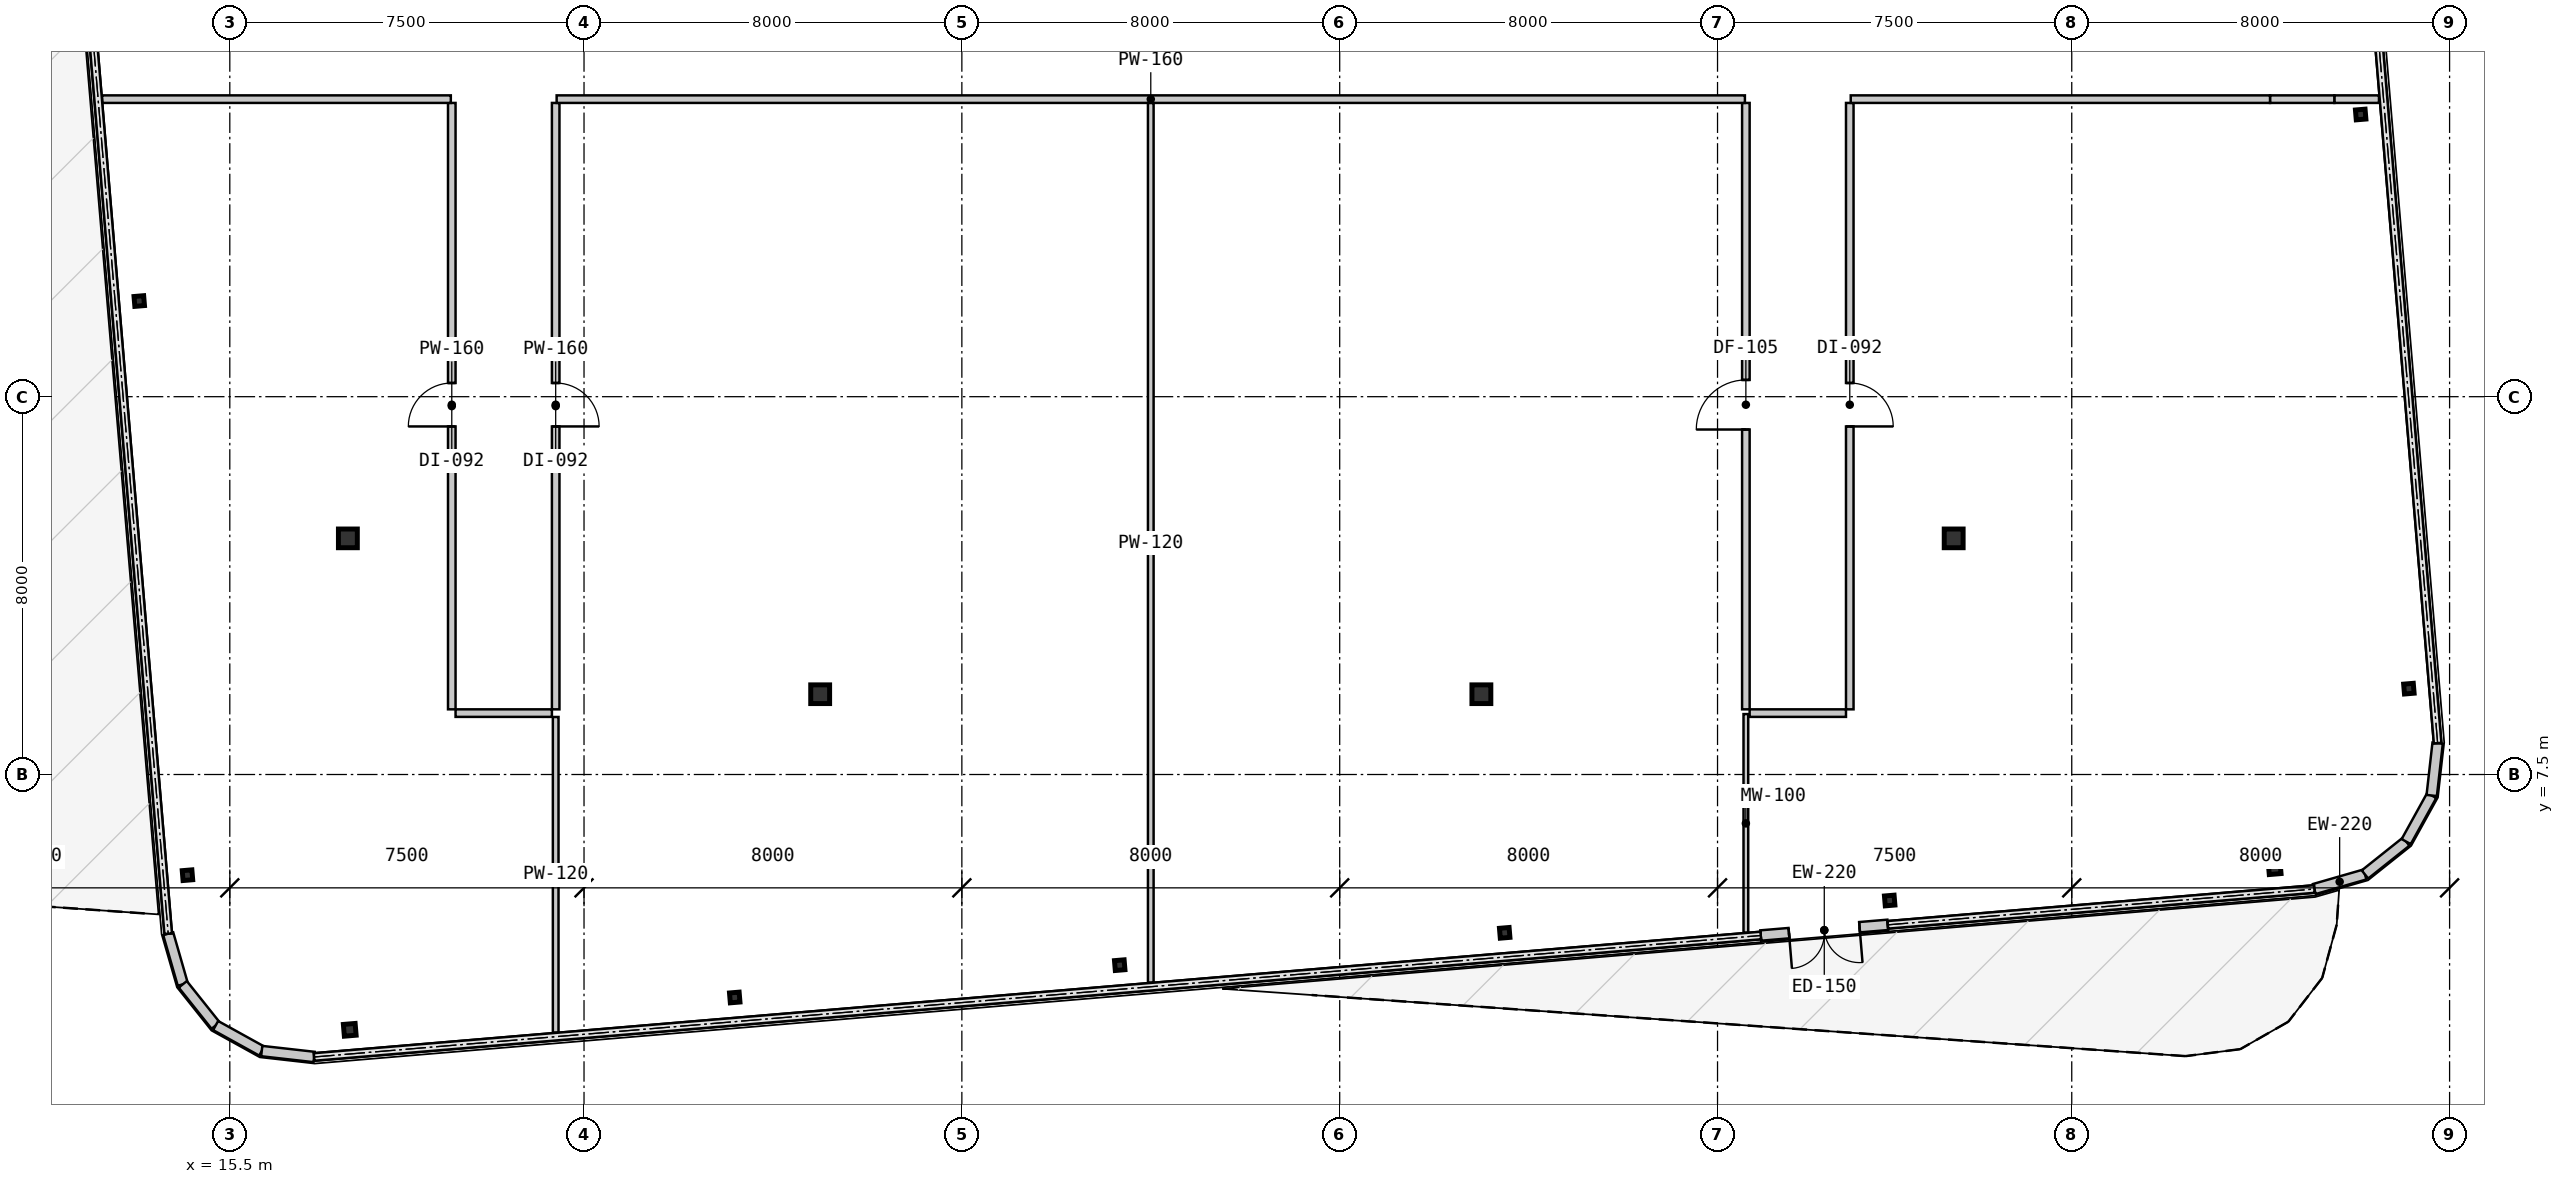
"""IFC4 building model, lengths in metres.
Left out: names, types, materials, properties, quantities, classifications, styles, units other than length and angle.
Written with IfcOpenShell. Run it as: python <this file> out.ifc"""

import sys

from ifc_helpers import new_model, si_unit, direction, frame, frame_2d, origin, origin_2d, place, context, subcontext, project, spatial, rectangle, hollow_rectangle, i_section, extrude, source, transform, mapped, element, fill, save


model = new_model("IFC4")
c1 = context("Model", 3, precision=1e-05, world=origin(), true_north=direction((0.0, 1.0)))
c2 = subcontext(c1, "Body", "Model", "MODEL_VIEW")
j1 = project(units=[si_unit("LENGTHUNIT", "METRE"), si_unit("PLANEANGLEUNIT", "RADIAN")], contexts=[c1])
p1 = place(None, origin())
s1 = spatial("IfcSite", under=j1, at=p1, CompositionType="ELEMENT")
p2 = place(p1, origin())
s2 = spatial("IfcBuilding", under=s1, at=p2, CompositionType="ELEMENT")
p3 = place(p2, frame((0.0, 0.0, 168.7)))
s3 = spatial("IfcBuildingStorey", under=s2, at=p3, CompositionType="ELEMENT", Elevation=168.7)
m1 = source(origin(), c2, "Body", "SweptSolid", [
    extrude(i_section(OverallWidth=0.4, OverallDepth=0.396, WebThickness=0.022, FlangeThickness=0.034, at=origin_2d()), origin(), (0.0, 0.0, 1.0), 3.85),
])
for number, where, z_axis, x_axis in (
    (1, (28.0, 9.2, 0.0), (0.0, 0.0, 1.0), (1.0, 0.0, 0.0)),
    (2, (42.0, 9.2, 0.0), (0.0, 0.0, 1.0), (1.0, 0.0, 0.0)),
    (3, (18.0, 12.5, 0.0), (0.0, 0.0, 1.0), (1.0, 0.0, 0.0)),
    (4, (52.0, 12.5, 0.0), (0.0, 0.0, 1.0), (1.0, 0.0, 0.0)),
):
    element("IfcColumn", number, at=place(p3, frame(where, z_axis=z_axis, x_axis=x_axis)), inside=s3, PredefinedType="COLUMN", context=c2, shape_type="MappedRepresentation", body=[
        mapped(m1, transform((0.0, 0.0, 0.0), scale=1.0)),
    ])
m2 = source(origin(), c2, "Body", "SweptSolid", [
    extrude(hollow_rectangle(XDim=0.25, YDim=0.25, WallThickness=0.01, at=origin_2d()), origin(), (0.0, 0.0, 1.0), 3.85),
])
p4 = place(p3, frame((18.04, 2.094, 0.0), z_axis=(0.0, 0.0, 1.0), x_axis=(0.99649285925, 0.083677843332, 0.0)))
e5 = element("IfcColumn", 5, at=p4, inside=s3, PredefinedType="COLUMN", context=c2, shape_type="MappedRepresentation", body=[
    mapped(m2, transform((0.0, 0.0, 0.0), scale=1.0)),
])
m3 = source(origin(), c2, "Body", "SweptSolid", [
    extrude(i_section(OverallWidth=0.205, OverallDepth=0.21, WebThickness=0.009, FlangeThickness=0.014, at=origin_2d()), origin(), (0.0, 0.0, 1.0), 3.85),
])
for number, where, z_axis, x_axis in (
    (6, (26.191, 2.779, 0.0), (0.0, 0.0, 1.0), (0.996, 0.084, 0.0)),
    (7, (34.342, 3.463, 0.0), (0.0, 0.0, 1.0), (0.996, 0.084, 0.0)),
    (8, (42.494, 4.147, 0.0), (0.0, 0.0, 1.0), (0.996, 0.084, 0.0)),
    (9, (50.645, 4.832, 0.0), (0.0, 0.0, 1.0), (0.996, 0.084, 0.0)),
):
    element("IfcColumn", number, at=place(p3, frame(where, z_axis=z_axis, x_axis=x_axis)), inside=s3, PredefinedType="COLUMN", context=c2, shape_type="MappedRepresentation", body=[
        mapped(m3, transform((0.0, 0.0, 0.0), scale=1.0)),
    ])
p5 = place(p3, frame((58.796, 5.516, 0.0), z_axis=(0.0, 0.0, 1.0), x_axis=(0.99649285925, 0.083677843332, 0.0)))
e10 = element("IfcColumn", 10, at=p5, inside=s3, PredefinedType="COLUMN", context=c2, shape_type="MappedRepresentation", body=[
    mapped(m2, transform((0.0, 0.0, 0.0), scale=1.0)),
])
for number, where, z_axis, x_axis in (
    (11, (14.604, 5.368, 0.0), (0.0, 0.0, 1.0), (0.996, 0.084, 0.0)),
    (12, (13.583, 17.525, 0.0), (0.0, 0.0, 1.0), (0.996, 0.084, 0.0)),
    (13, (61.638, 9.318, 0.0), (0.0, 0.0, 1.0), (0.996, 0.084, 0.0)),
    (14, (60.617, 21.475, 0.0), (0.0, 0.0, 1.0), (0.996, 0.084, 0.0)),
):
    element("IfcColumn", number, at=place(p3, frame(where, z_axis=z_axis, x_axis=x_axis)), inside=s3, PredefinedType="COLUMN", context=c2, shape_type="MappedRepresentation", body=[
        mapped(m3, transform((0.0, 0.0, 0.0), scale=1.0)),
    ])
m4 = source(origin(), c2, "Body", "SweptSolid", [
    extrude(rectangle(XDim=1.116, YDim=0.22, at=frame_2d((0.558, 0.0))), origin(), (0.0, 0.0, 1.0), 3.63),
])
for number, where, z_axis, x_axis in (
    (15, (59.636, 5.075, 0.0), (0.0, 0.0, 1.0), (0.961, 0.277, 0.0)),
    (16, (60.708, 5.384, 0.0), (0.0, 0.0, 1.0), (0.782, 0.623, 0.0)),
    (17, (61.581, 6.079, 0.0), (0.0, 0.0, 1.0), (0.484, 0.875, 0.0)),
    (18, (62.121, 7.056, 0.0), (0.0, 0.0, 1.0), (0.112, 0.994, 0.0)),
    (19, (14.196, 4.13, 0.0), (0.0, 0.0, 1.0), (0.277, -0.961, 0.0)),
    (20, (14.504, 3.057, 0.0), (0.0, 0.0, 1.0), (0.623, -0.782, 0.0)),
    (21, (15.2, 2.184, 0.0), (0.0, 0.0, 1.0), (0.875, -0.484, 0.0)),
    (22, (16.176, 1.644, 0.0), (0.0, 0.0, 1.0), (0.994, -0.112, 0.0)),
):
    element("IfcWall", number, at=place(p3, frame(where, z_axis=z_axis, x_axis=x_axis)), inside=s3, PredefinedType="SOLIDWALL", context=c2, shape_type="MappedRepresentation", body=[
        mapped(m4, transform((0.0, 0.0, 0.0), scale=1.0)),
    ])
m5 = source(origin(), c2, "Body", "SweptSolid", [
    extrude(rectangle(XDim=2.7, YDim=0.22, at=frame_2d((1.35, 0.0))), origin(), (0.0, 0.0, 1.0), 3.63),
])
p6 = place(p3, frame((47.915, 4.091, 0.0), z_axis=(0.0, 0.0, 1.0), x_axis=(0.99648878097, 0.083726396078, 0.0)))
e23 = element("IfcWall", 23, at=p6, inside=s3, PredefinedType="SOLIDWALL", context=c2, shape_type="MappedRepresentation", body=[
    mapped(m5, transform((0.0, 0.0, 0.0), scale=1.0)),
])
m6 = source(origin(), c2, "Body", "SweptSolid", [
    extrude(rectangle(XDim=1.5, YDim=2.2, at=frame_2d((0.75, 1.1))), frame((0.0, 0.12, 0.0), z_axis=(0.0, -1.0, 0.0), x_axis=(1.0, 0.0, 0.0)), (0.0, 0.0, 1.0), 0.24),
])
p7 = place(p6, frame((0.6, 0.0, 0.0)))
e24 = element("IfcOpeningElement", 24, at=p7, cuts=e23, PredefinedType="OPENING", context=c2, shape_type="MappedRepresentation", body=[
    mapped(m6, transform((0.0, 0.0, 0.0), scale=1.0)),
])
m7 = source(origin(), c2, "Body", "SweptSolid", [
    extrude(rectangle(XDim=12.84, YDim=0.16, at=frame_2d((6.42, 0.0))), origin(), (0.0, 0.0, 1.0), 3.63),
])
p8 = place(p3, frame((20.2, 8.88, 0.0), z_axis=(0.0, 0.0, 1.0), x_axis=(0.0, 1.0, 0.0)))
e25 = element("IfcWall", 25, at=p8, inside=s3, PredefinedType="PARTITIONING", context=c2, shape_type="MappedRepresentation", body=[
    mapped(m7, transform((0.0, 0.0, 0.0), scale=1.0)),
])
m8 = source(origin(), c2, "Body", "SweptSolid", [
    extrude(rectangle(XDim=0.92, YDim=2.1, at=frame_2d((0.46, 1.05))), frame((0.0, 0.09, 0.0), z_axis=(0.0, -1.0, 0.0), x_axis=(1.0, 0.0, 0.0)), (0.0, 0.0, 1.0), 0.18),
])
p9 = place(p8, frame((5.99, 0.0, 0.0)))
e26 = element("IfcOpeningElement", 26, at=p9, cuts=e25, PredefinedType="OPENING", context=c2, shape_type="MappedRepresentation", body=[
    mapped(m8, transform((0.0, 0.0, 0.0), scale=1.0)),
])
m9 = source(origin(), c2, "Body", "SweptSolid", [
    extrude(rectangle(XDim=7.384, YDim=0.16, at=frame_2d((3.692, 0.0))), origin(), (0.0, 0.0, 1.0), 3.63),
])
p10 = place(p3, frame((20.18, 21.8, 0.0), z_axis=(0.0, 0.0, 1.0), x_axis=(-1.0, 0.0, 0.0)))
e27 = element("IfcWall", 27, at=p10, inside=s3, PredefinedType="PARTITIONING", context=c2, shape_type="MappedRepresentation", body=[
    mapped(m9, transform((0.0, 0.0, 0.0), scale=1.0)),
])
m10 = source(origin(), c2, "Body", "SweptSolid", [
    extrude(rectangle(XDim=2.04, YDim=0.16, at=frame_2d((1.02, 0.0))), origin(), (0.0, 0.0, 1.0), 3.63),
])
p11 = place(p3, frame((22.32, 8.8, 0.0), z_axis=(0.0, 0.0, 1.0), x_axis=(-1.0, 0.0, 0.0)))
e28 = element("IfcWall", 28, at=p11, inside=s3, PredefinedType="PARTITIONING", context=c2, shape_type="MappedRepresentation", body=[
    mapped(m10, transform((0.0, 0.0, 0.0), scale=1.0)),
])
p12 = place(p3, frame((22.4, 21.72, 0.0), z_axis=(0.0, 0.0, 1.0), x_axis=(0.0, -1.0, 0.0)))
e29 = element("IfcWall", 29, at=p12, inside=s3, PredefinedType="PARTITIONING", context=c2, shape_type="MappedRepresentation", body=[
    mapped(m7, transform((0.0, 0.0, 0.0), scale=1.0)),
])
p13 = place(p12, frame((5.93, 0.0, 0.0)))
e30 = element("IfcOpeningElement", 30, at=p13, cuts=e29, PredefinedType="OPENING", context=c2, shape_type="MappedRepresentation", body=[
    mapped(m8, transform((0.0, 0.0, 0.0), scale=1.0)),
])
m11 = source(origin(), c2, "Body", "SweptSolid", [
    extrude(rectangle(XDim=12.559, YDim=0.16, at=frame_2d((6.28, 0.0))), origin(), (0.0, 0.0, 1.0), 3.63),
])
p14 = place(p3, frame((34.98, 21.8, 0.0), z_axis=(0.0, 0.0, 1.0), x_axis=(-1.0, 0.0, 0.0)))
e31 = element("IfcWall", 31, at=p14, inside=s3, PredefinedType="PARTITIONING", context=c2, shape_type="MappedRepresentation", body=[
    mapped(m11, transform((0.0, 0.0, 0.0), scale=1.0)),
])
p15 = place(p3, frame((47.6, 8.88, 0.0), z_axis=(0.0, 0.0, 1.0), x_axis=(0.0, 1.0, 0.0)))
e32 = element("IfcWall", 32, at=p15, inside=s3, PredefinedType="PARTITIONING", context=c2, shape_type="MappedRepresentation", body=[
    mapped(m7, transform((0.0, 0.0, 0.0), scale=1.0)),
])
m12 = source(origin(), c2, "Body", "SweptSolid", [
    extrude(rectangle(XDim=1.05, YDim=2.1, at=frame_2d((0.525, 1.05))), frame((0.0, 0.09, 0.0), z_axis=(0.0, -1.0, 0.0), x_axis=(1.0, 0.0, 0.0)), (0.0, 0.0, 1.0), 0.18),
])
p16 = place(p15, frame((5.925, 0.0, 0.0)))
e33 = element("IfcOpeningElement", 33, at=p16, cuts=e32, PredefinedType="OPENING", context=c2, shape_type="MappedRepresentation", body=[
    mapped(m12, transform((0.0, 0.0, 0.0), scale=1.0)),
])
p17 = place(p3, frame((47.58, 21.8, 0.0), z_axis=(0.0, 0.0, 1.0), x_axis=(-1.0, 0.0, 0.0)))
e34 = element("IfcWall", 34, at=p17, inside=s3, PredefinedType="PARTITIONING", context=c2, shape_type="MappedRepresentation", body=[
    mapped(m11, transform((0.0, 0.0, 0.0), scale=1.0)),
])
p18 = place(p3, frame((49.8, 21.72, 0.0), z_axis=(0.0, 0.0, 1.0), x_axis=(0.0, -1.0, 0.0)))
e35 = element("IfcWall", 35, at=p18, inside=s3, PredefinedType="PARTITIONING", context=c2, shape_type="MappedRepresentation", body=[
    mapped(m7, transform((0.0, 0.0, 0.0), scale=1.0)),
])
p19 = place(p18, frame((5.93, 0.0, 0.0)))
e36 = element("IfcOpeningElement", 36, at=p19, cuts=e35, PredefinedType="OPENING", context=c2, shape_type="MappedRepresentation", body=[
    mapped(m8, transform((0.0, 0.0, 0.0), scale=1.0)),
])
m13 = source(origin(), c2, "Body", "SweptSolid", [
    extrude(rectangle(XDim=0.945, YDim=0.16, at=frame_2d((0.473, 0.0))), origin(), (0.0, 0.0, 1.0), 3.63),
])
p20 = place(p3, frame((61.005, 21.8, 0.0), z_axis=(0.0, 0.0, 1.0), x_axis=(-1.0, 0.0, 0.0)))
e37 = element("IfcWall", 37, at=p20, inside=s3, PredefinedType="PARTITIONING", context=c2, shape_type="MappedRepresentation", body=[
    mapped(m13, transform((0.0, 0.0, 0.0), scale=1.0)),
])
m14 = source(origin(), c2, "Body", "SweptSolid", [
    extrude(rectangle(XDim=1.361, YDim=0.16, at=frame_2d((0.681, 0.0))), origin(), (0.0, 0.0, 1.0), 3.17),
])
p21 = place(p3, frame((60.059, 21.8, 0.0), z_axis=(0.0, 0.0, 1.0), x_axis=(-1.0, 0.0, 0.0)))
e38 = element("IfcWall", 38, at=p21, inside=s3, PredefinedType="PARTITIONING", context=c2, shape_type="MappedRepresentation", body=[
    mapped(m14, transform((0.0, 0.0, 0.0), scale=1.0)),
])
m15 = source(origin(), c2, "Body", "SweptSolid", [
    extrude(rectangle(XDim=8.878, YDim=0.16, at=frame_2d((4.439, 0.0))), origin(), (0.0, 0.0, 1.0), 3.63),
])
p22 = place(p3, frame((58.698, 21.8, 0.0), z_axis=(0.0, 0.0, 1.0), x_axis=(-1.0, 0.0, 0.0)))
e39 = element("IfcWall", 39, at=p22, inside=s3, PredefinedType="PARTITIONING", context=c2, shape_type="MappedRepresentation", body=[
    mapped(m15, transform((0.0, 0.0, 0.0), scale=1.0)),
])
p23 = place(p3, frame((49.72, 8.8, 0.0), z_axis=(0.0, 0.0, 1.0), x_axis=(-1.0, 0.0, 0.0)))
e40 = element("IfcWall", 40, at=p23, inside=s3, PredefinedType="PARTITIONING", context=c2, shape_type="MappedRepresentation", body=[
    mapped(m10, transform((0.0, 0.0, 0.0), scale=1.0)),
])
m16 = source(origin(), c2, "Body", "SweptSolid", [
    extrude(rectangle(XDim=6.684, YDim=0.12, at=frame_2d((3.342, 0.0))), origin(), (0.0, 0.0, 1.0), 3.63),
])
p24 = place(p3, frame((22.4, 8.718, 0.0), z_axis=(0.0, 0.0, 1.0), x_axis=(0.0, -1.0, 0.0)))
e41 = element("IfcWall", 41, at=p24, inside=s3, PredefinedType="PARTITIONING", context=c2, shape_type="MappedRepresentation", body=[
    mapped(m16, transform((0.0, 0.0, 0.0), scale=1.0)),
])
m17 = source(origin(), c2, "Body", "SweptSolid", [
    extrude(rectangle(XDim=18.626, YDim=0.12, at=frame_2d((9.313, 0.0))), origin(), (0.0, 0.0, 1.0), 3.63),
])
p25 = place(p3, frame((35.0, 21.718, 0.0), z_axis=(0.0, 0.0, 1.0), x_axis=(0.0, -1.0, 0.0)))
e42 = element("IfcWall", 42, at=p25, inside=s3, PredefinedType="PARTITIONING", context=c2, shape_type="MappedRepresentation", body=[
    mapped(m17, transform((0.0, 0.0, 0.0), scale=1.0)),
])
m18 = source(origin(), c2, "Body", "SweptSolid", [
    extrude(rectangle(XDim=4.63, YDim=0.1, at=frame_2d((2.315, 0.0))), origin(), (0.0, 0.0, 1.0), 3.63),
])
p26 = place(p3, frame((47.6, 8.78, 0.0), z_axis=(0.0, 0.0, 1.0), x_axis=(0.0, -1.0, 0.0)))
e43 = element("IfcWall", 43, at=p26, inside=s3, PredefinedType="MOVABLE", context=c2, shape_type="MappedRepresentation", body=[
    mapped(m18, transform((0.0, 0.0, 0.0), scale=1.0)),
])
m19 = source(origin(), c2, "Body", "SweptSolid", [
    extrude(rectangle(XDim=1.5, YDim=2.2, at=frame_2d((0.75, 1.1))), frame((0.0, 0.025, 0.0), z_axis=(0.0, -1.0, 0.0), x_axis=(1.0, 0.0, 0.0)), (0.0, 0.0, 1.0), 0.05),
])
p27 = place(p7, frame((1.5, 0.0, 0.0), z_axis=(0.0, 0.0, 1.0), x_axis=(-1.0, 0.0, 0.0)))
e44 = element("IfcDoor", 44, at=p27, inside=s3, OperationType="DOUBLE_DOOR_SINGLE_SWING", PredefinedType="DOOR", context=c2, shape_type="MappedRepresentation", body=[
    mapped(m19, transform((0.0, 0.0, 0.0), scale=1.0)),
])
fill(e24, e44)
m20 = source(origin(), c2, "Body", "SweptSolid", [
    extrude(rectangle(XDim=0.92, YDim=2.1, at=frame_2d((0.46, 1.05))), frame((0.0, 0.025, 0.0), z_axis=(0.0, -1.0, 0.0), x_axis=(1.0, 0.0, 0.0)), (0.0, 0.0, 1.0), 0.05),
])
p28 = place(p9, origin())
e45 = element("IfcDoor", 45, at=p28, inside=s3, OperationType="SINGLE_SWING_LEFT", PredefinedType="DOOR", context=c2, shape_type="MappedRepresentation", body=[
    mapped(m20, transform((0.0, 0.0, 0.0), scale=1.0)),
])
fill(e26, e45)
p29 = place(p13, origin())
e46 = element("IfcDoor", 46, at=p29, inside=s3, OperationType="SINGLE_SWING_RIGHT", PredefinedType="DOOR", context=c2, shape_type="MappedRepresentation", body=[
    mapped(m20, transform((0.0, 0.0, 0.0), scale=1.0)),
])
fill(e30, e46)
m21 = source(origin(), c2, "Body", "SweptSolid", [
    extrude(rectangle(XDim=1.05, YDim=2.1, at=frame_2d((0.525, 1.05))), frame((0.0, 0.025, 0.0), z_axis=(0.0, -1.0, 0.0), x_axis=(1.0, 0.0, 0.0)), (0.0, 0.0, 1.0), 0.05),
])
p30 = place(p16, origin())
e47 = element("IfcDoor", 47, at=p30, inside=s3, OperationType="SINGLE_SWING_LEFT", PredefinedType="DOOR", context=c2, shape_type="MappedRepresentation", body=[
    mapped(m21, transform((0.0, 0.0, 0.0), scale=1.0)),
])
fill(e33, e47)
p31 = place(p19, origin())
e48 = element("IfcDoor", 48, at=p31, inside=s3, OperationType="SINGLE_SWING_RIGHT", PredefinedType="DOOR", context=c2, shape_type="MappedRepresentation", body=[
    mapped(m20, transform((0.0, 0.0, 0.0), scale=1.0)),
])
fill(e36, e48)
save(model, sys.argv[1])
